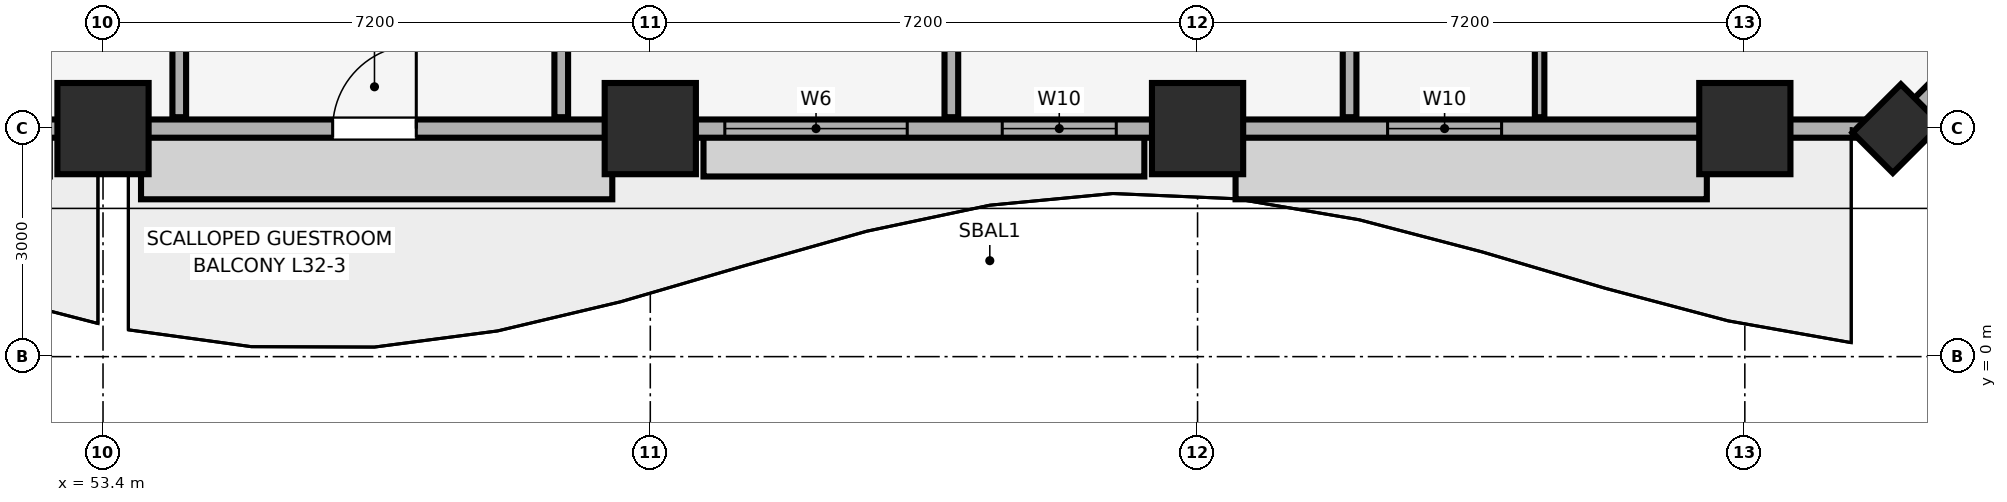
"""IFC4 building model, lengths in metres.
Left out: names, types, materials, properties, quantities, classifications, styles, units other than length and angle.
Written with IfcOpenShell. Run it as: python <this file> out.ifc"""

import sys

from ifc_helpers import new_model, si_unit, direction, frame, frame_2d, origin, origin_2d, place, context, subcontext, project, spatial, rectangle, extrude, element, fill, save


model = new_model("IFC4")
c1 = context("Model", 3, precision=1e-05, world=origin(), true_north=direction((0.0, 1.0)))
c2 = subcontext(c1, "Body", "Model", "MODEL_VIEW")
j1 = project(units=[si_unit("LENGTHUNIT", "METRE"), si_unit("PLANEANGLEUNIT", "RADIAN")], contexts=[c1])
p1 = place(None, origin())
s1 = spatial("IfcSite", under=j1, at=p1, CompositionType="ELEMENT")
p2 = place(p1, origin())
s2 = spatial("IfcBuilding", under=s1, at=p2, CompositionType="ELEMENT")
p3 = place(p2, frame((0.0, 0.0, 135.35)))
s3 = spatial("IfcBuildingStorey", under=s2, at=p3, CompositionType="ELEMENT", Elevation=135.35)
for number, where, z_axis, x_axis in (
    (1, (53.4, 3.0, 0.0), (0.0, 0.0, 1.0), (1.0, 0.0, 0.0)),
    (2, (60.6, 3.0, 0.0), (0.0, 0.0, 1.0), (1.0, 0.0, 0.0)),
    (3, (67.8, 3.0, 0.0), (0.0, 0.0, 1.0), (1.0, 0.0, 0.0)),
    (4, (75.0, 3.0, 0.0), (0.0, 0.0, 1.0), (1.0, 0.0, 0.0)),
):
    element("IfcColumn", number, at=place(p3, frame(where, z_axis=z_axis, x_axis=x_axis)), inside=s3, PredefinedType="COLUMN", context=c2, shape_type="SweptSolid", body=[
        extrude(rectangle(XDim=1.2, YDim=1.2, at=origin_2d()), origin(), (0.0, 0.0, 1.0), 3.56),
    ])
p4 = place(p3, frame((77.0, 3.0, 0.0), z_axis=(0.0, 0.0, 1.0), x_axis=(0.707106781187, 0.707106781187, 0.0)))
e5 = element("IfcColumn", 5, at=p4, inside=s3, PredefinedType="PILASTER", context=c2, shape_type="SweptSolid", body=[
    extrude(rectangle(XDim=0.9, YDim=0.75, at=origin_2d()), origin(), (0.0, 0.0, 1.0), 3.56),
])
p5 = place(p3, frame((7.0, 3.0, 0.0), z_axis=(0.0, 0.0, 1.0), x_axis=(1.0, 0.0, 0.0)))
e6 = element("IfcWall", 6, at=p5, inside=s3, PredefinedType="SOLIDWALL", context=c2, shape_type="SweptSolid", body=[
    extrude(rectangle(XDim=70.0, YDim=0.24, at=frame_2d((35.0, 0.0))), origin(), (0.0, 0.0, 1.0), 2.61),
])
p6 = place(p5, frame((19.517, 0.0, 0.0)))
e7 = element("IfcOpeningElement", 7, at=p6, cuts=e6, PredefinedType="OPENING", context=c2, shape_type="SweptSolid", body=[
    extrude(rectangle(XDim=1.1, YDim=2.15, at=frame_2d((0.55, 1.075))), frame((0.0, 0.13, 0.0), z_axis=(0.0, -1.0, 0.0), x_axis=(1.0, 0.0, 0.0)), (0.0, 0.0, 1.0), 0.26),
])
p7 = place(p5, frame((34.45, 0.0, 0.0)))
e8 = element("IfcOpeningElement", 8, at=p7, cuts=e6, PredefinedType="OPENING", context=c2, shape_type="SweptSolid", body=[
    extrude(rectangle(XDim=1.1, YDim=2.15, at=frame_2d((0.55, 1.075))), frame((0.0, 0.13, 0.0), z_axis=(0.0, -1.0, 0.0), x_axis=(1.0, 0.0, 0.0)), (0.0, 0.0, 1.0), 0.26),
])
p8 = place(p5, frame((49.421, 0.0, 0.0)))
e9 = element("IfcOpeningElement", 9, at=p8, cuts=e6, PredefinedType="OPENING", context=c2, shape_type="SweptSolid", body=[
    extrude(rectangle(XDim=1.1, YDim=2.15, at=frame_2d((0.55, 1.075))), frame((0.0, 0.13, 0.0), z_axis=(0.0, -1.0, 0.0), x_axis=(1.0, 0.0, 0.0)), (0.0, 0.0, 1.0), 0.26),
])
p9 = place(p5, frame((5.2, 0.0, 0.85)))
e10 = element("IfcOpeningElement", 10, at=p9, cuts=e6, PredefinedType="OPENING", context=c2, shape_type="SweptSolid", body=[
    extrude(rectangle(XDim=1.5, YDim=1.4, at=frame_2d((0.75, 0.7))), frame((0.0, 0.13, 0.0), z_axis=(0.0, -1.0, 0.0), x_axis=(1.0, 0.0, 0.0)), (0.0, 0.0, 1.0), 0.26),
])
p10 = place(p5, frame((10.163, 0.0, 0.85)))
e11 = element("IfcOpeningElement", 11, at=p10, cuts=e6, PredefinedType="OPENING", context=c2, shape_type="SweptSolid", body=[
    extrude(rectangle(XDim=1.5, YDim=1.4, at=frame_2d((0.75, 0.7))), frame((0.0, 0.13, 0.0), z_axis=(0.0, -1.0, 0.0), x_axis=(1.0, 0.0, 0.0)), (0.0, 0.0, 1.0), 0.26),
])
p11 = place(p5, frame((12.913, 0.0, 0.85)))
e12 = element("IfcOpeningElement", 12, at=p11, cuts=e6, PredefinedType="OPENING", context=c2, shape_type="SweptSolid", body=[
    extrude(rectangle(XDim=2.4, YDim=1.5, at=frame_2d((1.2, 0.75))), frame((0.0, 0.13, 0.0), z_axis=(0.0, -1.0, 0.0), x_axis=(1.0, 0.0, 0.0)), (0.0, 0.0, 1.0), 0.26),
])
p12 = place(p5, frame((24.45, 0.0, 0.85)))
e13 = element("IfcOpeningElement", 13, at=p12, cuts=e6, PredefinedType="OPENING", context=c2, shape_type="SweptSolid", body=[
    extrude(rectangle(XDim=2.4, YDim=1.5, at=frame_2d((1.2, 0.75))), frame((0.0, 0.13, 0.0), z_axis=(0.0, -1.0, 0.0), x_axis=(1.0, 0.0, 0.0)), (0.0, 0.0, 1.0), 0.26),
])
p13 = place(p5, frame((28.101, 0.0, 0.85)))
e14 = element("IfcOpeningElement", 14, at=p13, cuts=e6, PredefinedType="OPENING", context=c2, shape_type="SweptSolid", body=[
    extrude(rectangle(XDim=1.5, YDim=1.4, at=frame_2d((0.75, 0.7))), frame((0.0, 0.13, 0.0), z_axis=(0.0, -1.0, 0.0), x_axis=(1.0, 0.0, 0.0)), (0.0, 0.0, 1.0), 0.26),
])
p14 = place(p5, frame((40.239, 0.0, 0.85)))
e15 = element("IfcOpeningElement", 15, at=p14, cuts=e6, PredefinedType="OPENING", context=c2, shape_type="SweptSolid", body=[
    extrude(rectangle(XDim=1.5, YDim=1.4, at=frame_2d((0.75, 0.7))), frame((0.0, 0.13, 0.0), z_axis=(0.0, -1.0, 0.0), x_axis=(1.0, 0.0, 0.0)), (0.0, 0.0, 1.0), 0.26),
])
p15 = place(p5, frame((42.989, 0.0, 0.85)))
e16 = element("IfcOpeningElement", 16, at=p15, cuts=e6, PredefinedType="OPENING", context=c2, shape_type="SweptSolid", body=[
    extrude(rectangle(XDim=2.4, YDim=1.5, at=frame_2d((1.2, 0.75))), frame((0.0, 0.13, 0.0), z_axis=(0.0, -1.0, 0.0), x_axis=(1.0, 0.0, 0.0)), (0.0, 0.0, 1.0), 0.26),
])
p16 = place(p5, frame((54.581, 0.0, 0.85)))
e17 = element("IfcOpeningElement", 17, at=p16, cuts=e6, PredefinedType="OPENING", context=c2, shape_type="SweptSolid", body=[
    extrude(rectangle(XDim=2.4, YDim=1.5, at=frame_2d((1.2, 0.75))), frame((0.0, 0.13, 0.0), z_axis=(0.0, -1.0, 0.0), x_axis=(1.0, 0.0, 0.0)), (0.0, 0.0, 1.0), 0.26),
])
p17 = place(p5, frame((58.23, 0.0, 0.85)))
e18 = element("IfcOpeningElement", 18, at=p17, cuts=e6, PredefinedType="OPENING", context=c2, shape_type="SweptSolid", body=[
    extrude(rectangle(XDim=1.5, YDim=1.4, at=frame_2d((0.75, 0.7))), frame((0.0, 0.13, 0.0), z_axis=(0.0, -1.0, 0.0), x_axis=(1.0, 0.0, 0.0)), (0.0, 0.0, 1.0), 0.26),
])
p18 = place(p5, frame((63.3, 0.0, 0.85)))
e19 = element("IfcOpeningElement", 19, at=p18, cuts=e6, PredefinedType="OPENING", context=c2, shape_type="SweptSolid", body=[
    extrude(rectangle(XDim=1.5, YDim=1.4, at=frame_2d((0.75, 0.7))), frame((0.0, 0.13, 0.0), z_axis=(0.0, -1.0, 0.0), x_axis=(1.0, 0.0, 0.0)), (0.0, 0.0, 1.0), 0.26),
])
p19 = place(p3, frame((77.0, 3.0, 0.0), z_axis=(0.0, 0.0, 1.0), x_axis=(0.707106781187, 0.707106781187, 0.0)))
e20 = element("IfcWall", 20, at=p19, inside=s3, PredefinedType="SOLIDWALL", context=c2, shape_type="SweptSolid", body=[
    extrude(rectangle(XDim=5.657, YDim=0.24, at=frame_2d((2.828, 0.0))), origin(), (0.0, 0.0, 1.0), 2.61),
])
p20 = place(p19, frame((1.778, 0.0, 0.85)))
e21 = element("IfcOpeningElement", 21, at=p20, cuts=e20, PredefinedType="OPENING", context=c2, shape_type="SweptSolid", body=[
    extrude(rectangle(XDim=2.1, YDim=1.6, at=frame_2d((1.05, 0.8))), frame((0.0, 0.13, 0.0), z_axis=(0.0, -1.0, 0.0), x_axis=(1.0, 0.0, 0.0)), (0.0, 0.0, 1.0), 0.26),
])
for number, where, z_axis, x_axis in (
    (22, (54.403, 3.15, 0.0), (0.0, 0.0, 1.0), (0.0, 1.0, 0.0)),
    (23, (59.428, 3.15, 0.0), (0.0, 0.0, 1.0), (0.0, 1.0, 0.0)),
    (24, (64.561, 3.15, 0.0), (0.0, 0.0, 1.0), (0.0, 1.0, 0.0)),
    (25, (69.8, 3.15, 0.0), (0.0, 0.0, 1.0), (0.0, 1.0, 0.0)),
):
    element("IfcWall", number, at=place(p3, frame(where, z_axis=z_axis, x_axis=x_axis)), inside=s3, PredefinedType="PARTITIONING", context=c2, shape_type="SweptSolid", body=[
        extrude(rectangle(XDim=6.555, YDim=0.18, at=frame_2d((3.278, 0.0))), origin(), (0.0, 0.0, 1.0), 3.56),
    ])
p21 = place(p3, frame((72.3, 3.15, 0.0), z_axis=(0.0, 0.0, 1.0), x_axis=(0.0, 1.0, 0.0)))
e26 = element("IfcWall", 26, at=p21, inside=s3, PredefinedType="PARTITIONING", context=c2, shape_type="SweptSolid", body=[
    extrude(rectangle(XDim=2.153, YDim=0.125, at=frame_2d((1.076, 0.0))), origin(), (0.0, 0.0, 1.0), 3.56),
])
p22 = place(p8, origin())
e27 = element("IfcDoor", 27, at=p22, inside=s3, OperationType="SINGLE_SWING_RIGHT", PredefinedType="DOOR", context=c2, shape_type="SweptSolid", body=[
    extrude(rectangle(XDim=1.1, YDim=2.15, at=frame_2d((0.55, 1.075))), frame((0.0, 0.025, 0.0), z_axis=(0.0, -1.0, 0.0), x_axis=(1.0, 0.0, 0.0)), (0.0, 0.0, 1.0), 0.05),
])
fill(e9, e27)
p23 = place(p16, origin())
e28 = element("IfcWindow", 28, at=p23, inside=s3, PartitioningType="SINGLE_PANEL", PredefinedType="WINDOW", context=c2, shape_type="SweptSolid", body=[
    extrude(rectangle(XDim=2.4, YDim=1.5, at=frame_2d((1.2, 0.75))), frame((0.0, 0.03, 0.0), z_axis=(0.0, -1.0, 0.0), x_axis=(1.0, 0.0, 0.0)), (0.0, 0.0, 1.0), 0.06),
])
fill(e17, e28)
p24 = place(p17, origin())
e29 = element("IfcWindow", 29, at=p24, inside=s3, PartitioningType="SINGLE_PANEL", PredefinedType="WINDOW", context=c2, shape_type="SweptSolid", body=[
    extrude(rectangle(XDim=1.5, YDim=1.4, at=frame_2d((0.75, 0.7))), frame((0.0, 0.03, 0.0), z_axis=(0.0, -1.0, 0.0), x_axis=(1.0, 0.0, 0.0)), (0.0, 0.0, 1.0), 0.06),
])
fill(e18, e29)
p25 = place(p18, origin())
e30 = element("IfcWindow", 30, at=p25, inside=s3, PartitioningType="SINGLE_PANEL", PredefinedType="WINDOW", context=c2, shape_type="SweptSolid", body=[
    extrude(rectangle(XDim=1.5, YDim=1.4, at=frame_2d((0.75, 0.7))), frame((0.0, 0.03, 0.0), z_axis=(0.0, -1.0, 0.0), x_axis=(1.0, 0.0, 0.0)), (0.0, 0.0, 1.0), 0.06),
])
fill(e19, e30)
save(model, sys.argv[1])
